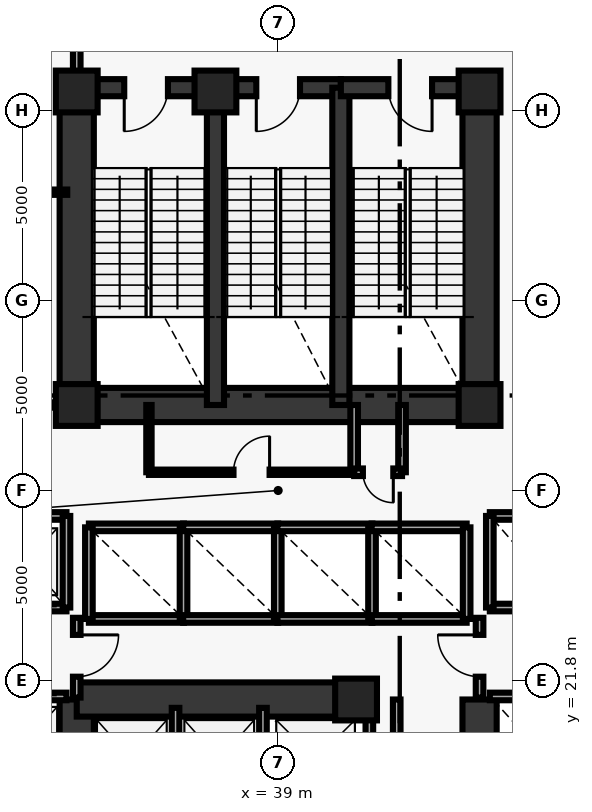
"""IFC4 building model, lengths in metres.
Left out: names, types, materials, properties, quantities, classifications, styles, units other than length and angle.
Written with IfcOpenShell. Run it as: python <this file> out.ifc"""

import sys

from ifc_helpers import new_model, si_unit, direction, frame, frame_2d, origin, origin_2d, place, context, subcontext, project, spatial, rectangle, extrude, element, fill, save


model = new_model("IFC4")
c1 = context("Model", 3, precision=1e-05, world=origin(), true_north=direction((0.0, 1.0)))
c2 = subcontext(c1, "Body", "Model", "MODEL_VIEW")
j1 = project(units=[si_unit("LENGTHUNIT", "METRE"), si_unit("PLANEANGLEUNIT", "RADIAN")], contexts=[c1])
p1 = place(None, origin())
s1 = spatial("IfcSite", under=j1, at=p1, CompositionType="ELEMENT")
p2 = place(p1, origin())
s2 = spatial("IfcBuilding", under=s1, at=p2, CompositionType="ELEMENT")
p3 = place(p2, frame((0.0, 0.0, 16.0)))
s3 = spatial("IfcBuildingStorey", under=s2, at=p3, CompositionType="ELEMENT", Elevation=16.0)
for number, where, z_axis, x_axis in (
    (1, (41.05, 21.3, 0.0), (0.0, 0.0, 1.0), (1.0, 0.0, 0.0)),
    (2, (44.3, 29.05, 0.0), (0.0, 0.0, 1.0), (1.0, 0.0, 0.0)),
    (3, (44.3, 37.3, 0.0), (0.0, 0.0, 1.0), (1.0, 0.0, 0.0)),
    (4, (37.35, 37.3, 0.0), (0.0, 0.0, 1.0), (1.0, 0.0, 0.0)),
    (5, (33.7, 37.3, 0.0), (0.0, 0.0, 1.0), (1.0, 0.0, 0.0)),
    (6, (33.7, 29.05, 0.0), (0.0, 0.0, 1.0), (1.0, 0.0, 0.0)),
):
    element("IfcColumn", number, at=place(p3, frame(where, z_axis=z_axis, x_axis=x_axis)), inside=s3, PredefinedType="PILASTER", context=c2, shape_type="SweptSolid", body=[
        extrude(rectangle(XDim=1.1, YDim=1.1, at=origin_2d()), origin(), (0.0, 0.0, 1.0), 4.74),
    ])
p4 = place(p3, frame((33.7, 29.05, 0.0), z_axis=(0.0, 0.0, 1.0), x_axis=(0.0, 1.0, 0.0)))
e7 = element("IfcWall", 7, at=p4, inside=s3, PredefinedType="SHEAR", context=c2, shape_type="SweptSolid", body=[
    extrude(rectangle(XDim=8.35, YDim=0.9, at=frame_2d((4.175, 0.0))), origin(), (0.0, 0.0, 1.0), 4.74),
])
p5 = place(p3, frame((33.7, 18.35, 0.0), z_axis=(0.0, 0.0, 1.0), x_axis=(0.0, 1.0, 0.0)))
e8 = element("IfcWall", 8, at=p5, inside=s3, PredefinedType="SHEAR", context=c2, shape_type="SweptSolid", body=[
    extrude(rectangle(XDim=2.95, YDim=0.9, at=frame_2d((1.475, 0.0))), origin(), (0.0, 0.0, 1.0), 4.74),
])
p6 = place(p3, frame((44.3, 29.05, 0.0), z_axis=(0.0, 0.0, 1.0), x_axis=(0.0, 1.0, 0.0)))
e9 = element("IfcWall", 9, at=p6, inside=s3, PredefinedType="SHEAR", context=c2, shape_type="SweptSolid", body=[
    extrude(rectangle(XDim=8.35, YDim=0.9, at=frame_2d((4.175, 0.0))), origin(), (0.0, 0.0, 1.0), 4.74),
])
p7 = place(p3, frame((44.3, 18.35, 0.0), z_axis=(0.0, 0.0, 1.0), x_axis=(0.0, 1.0, 0.0)))
e10 = element("IfcWall", 10, at=p7, inside=s3, PredefinedType="SHEAR", context=c2, shape_type="SweptSolid", body=[
    extrude(rectangle(XDim=2.95, YDim=0.9, at=frame_2d((1.475, 0.0))), origin(), (0.0, 0.0, 1.0), 4.74),
])
p8 = place(p3, frame((33.7, 29.05, 0.0), z_axis=(0.0, 0.0, 1.0), x_axis=(1.0, 0.0, 0.0)))
e11 = element("IfcWall", 11, at=p8, inside=s3, PredefinedType="SHEAR", context=c2, shape_type="SweptSolid", body=[
    extrude(rectangle(XDim=10.6, YDim=0.9, at=frame_2d((5.3, 0.0))), origin(), (0.0, 0.0, 1.0), 4.74),
])
p9 = place(p3, frame((33.7, 21.3, 0.0), z_axis=(0.0, 0.0, 1.0), x_axis=(1.0, 0.0, 0.0)))
e12 = element("IfcWall", 12, at=p9, inside=s3, PredefinedType="SHEAR", context=c2, shape_type="SweptSolid", body=[
    extrude(rectangle(XDim=7.55, YDim=0.9, at=frame_2d((3.775, 0.0))), origin(), (0.0, 0.0, 1.0), 4.74),
])
p10 = place(p3, frame((37.35, 37.4, 0.0), z_axis=(0.0, 0.0, 1.0), x_axis=(-1.0, 0.0, 0.0)))
e13 = element("IfcWall", 13, at=p10, inside=s3, PredefinedType="SHEAR", context=c2, shape_type="SweptSolid", body=[
    extrude(rectangle(XDim=3.65, YDim=0.45, at=frame_2d((1.825, 0.0))), origin(), (0.0, 0.0, 1.0), 4.74),
])
p11 = place(p10, frame((1.25, 0.0, 0.0)))
e14 = element("IfcOpeningElement", 14, at=p11, cuts=e13, PredefinedType="OPENING", context=c2, shape_type="SweptSolid", body=[
    extrude(rectangle(XDim=1.15, YDim=2.15, at=frame_2d((0.575, 1.075))), frame((0.0, 0.235, 0.0), z_axis=(0.0, -1.0, 0.0), x_axis=(1.0, 0.0, 0.0)), (0.0, 0.0, 1.0), 0.47),
])
p12 = place(p3, frame((37.35, 29.05, 0.0), z_axis=(0.0, 0.0, 1.0), x_axis=(0.0, 1.0, 0.0)))
e15 = element("IfcWall", 15, at=p12, inside=s3, PredefinedType="SHEAR", context=c2, shape_type="SweptSolid", body=[
    extrude(rectangle(XDim=8.35, YDim=0.45, at=frame_2d((4.175, 0.0))), origin(), (0.0, 0.0, 1.0), 4.74),
])
p13 = place(p3, frame((40.65, 37.4, 0.0), z_axis=(0.0, 0.0, 1.0), x_axis=(-1.0, 0.0, 0.0)))
e16 = element("IfcWall", 16, at=p13, inside=s3, PredefinedType="SHEAR", context=c2, shape_type="SweptSolid", body=[
    extrude(rectangle(XDim=3.3, YDim=0.45, at=frame_2d((1.65, 0.0))), origin(), (0.0, 0.0, 1.0), 4.74),
])
p14 = place(p13, frame((1.075, 0.0, 0.0)))
e17 = element("IfcOpeningElement", 17, at=p14, cuts=e16, PredefinedType="OPENING", context=c2, shape_type="SweptSolid", body=[
    extrude(rectangle(XDim=1.15, YDim=2.15, at=frame_2d((0.575, 1.075))), frame((0.0, 0.235, 0.0), z_axis=(0.0, -1.0, 0.0), x_axis=(1.0, 0.0, 0.0)), (0.0, 0.0, 1.0), 0.47),
])
p15 = place(p3, frame((40.65, 29.05, 0.0), z_axis=(0.0, 0.0, 1.0), x_axis=(0.0, 1.0, 0.0)))
e18 = element("IfcWall", 18, at=p15, inside=s3, PredefinedType="SHEAR", context=c2, shape_type="SweptSolid", body=[
    extrude(rectangle(XDim=8.35, YDim=0.45, at=frame_2d((4.175, 0.0))), origin(), (0.0, 0.0, 1.0), 4.74),
])
p16 = place(p3, frame((44.3, 37.4, 0.0), z_axis=(0.0, 0.0, 1.0), x_axis=(-1.0, 0.0, 0.0)))
e19 = element("IfcWall", 19, at=p16, inside=s3, PredefinedType="SHEAR", context=c2, shape_type="SweptSolid", body=[
    extrude(rectangle(XDim=3.65, YDim=0.45, at=frame_2d((1.825, 0.0))), origin(), (0.0, 0.0, 1.0), 4.74),
])
p17 = place(p16, frame((1.25, 0.0, 0.0)))
e20 = element("IfcOpeningElement", 20, at=p17, cuts=e19, PredefinedType="OPENING", context=c2, shape_type="SweptSolid", body=[
    extrude(rectangle(XDim=1.15, YDim=2.15, at=frame_2d((0.575, 1.075))), frame((0.0, 0.235, 0.0), z_axis=(0.0, -1.0, 0.0), x_axis=(1.0, 0.0, 0.0)), (0.0, 0.0, 1.0), 0.47),
])
p18 = place(p3, frame((33.7, 37.4, 0.0), z_axis=(0.0, 0.0, 1.0), x_axis=(0.0, 1.0, 0.0)))
e21 = element("IfcWall", 21, at=p18, inside=s3, PredefinedType="SOLIDWALL", context=c2, shape_type="SweptSolid", body=[
    extrude(rectangle(XDim=1.88, YDim=0.2, at=frame_2d((0.94, 0.0))), origin(), (0.0, 0.0, 1.0), 4.74),
])
p19 = place(p3, frame((35.6, 27.28, 0.0), z_axis=(0.0, 0.0, 1.0), x_axis=(0.0, 1.0, 0.0)))
e22 = element("IfcWall", 22, at=p19, inside=s3, PredefinedType="PARTITIONING", context=c2, shape_type="SweptSolid", body=[
    extrude(rectangle(XDim=1.77, YDim=0.14, at=frame_2d((0.885, 0.0))), origin(), (0.0, 0.0, 1.0), 4.74),
])
for number, where, z_axis, x_axis in (
    (23, (41.0, 27.28, 0.0), (0.0, 0.0, 1.0), (0.0, 1.0, 0.0)),
    (24, (42.26, 27.28, 0.0), (0.0, 0.0, 1.0), (0.0, 1.0, 0.0)),
):
    element("IfcWall", number, at=place(p3, frame(where, z_axis=z_axis, x_axis=x_axis)), inside=s3, PredefinedType="SOLIDWALL", context=c2, shape_type="SweptSolid", body=[
        extrude(rectangle(XDim=1.77, YDim=0.2, at=frame_2d((0.885, 0.0))), origin(), (0.0, 0.0, 1.0), 4.74),
    ])
p20 = place(p3, frame((41.0, 27.28, 0.0), z_axis=(0.0, 0.0, 1.0), x_axis=(1.0, 0.0, 0.0)))
e25 = element("IfcWall", 25, at=p20, inside=s3, PredefinedType="SOLIDWALL", context=c2, shape_type="SweptSolid", body=[
    extrude(rectangle(XDim=1.26, YDim=0.2, at=frame_2d((0.63, 0.0))), origin(), (0.0, 0.0, 1.0), 4.74),
])
p21 = place(p20, frame((0.23, 0.0, 0.0)))
e26 = element("IfcOpeningElement", 26, at=p21, cuts=e25, PredefinedType="OPENING", context=c2, shape_type="SweptSolid", body=[
    extrude(rectangle(XDim=0.8, YDim=2.05, at=frame_2d((0.4, 1.025))), frame((0.0, 0.11, 0.0), z_axis=(0.0, -1.0, 0.0), x_axis=(1.0, 0.0, 0.0)), (0.0, 0.0, 1.0), 0.22),
])
p22 = place(p3, frame((31.32, 23.72, 0.0), z_axis=(0.0, 0.0, 1.0), x_axis=(1.0, 0.0, 0.0)))
e27 = element("IfcWall", 27, at=p22, inside=s3, PredefinedType="SOLIDWALL", context=c2, shape_type="SweptSolid", body=[
    extrude(rectangle(XDim=2.11, YDim=0.2, at=frame_2d((1.055, 0.0))), origin(), (0.0, 0.0, 1.0), 4.74),
])
p23 = place(p22, frame((0.505, 0.0, 0.0)))
e28 = element("IfcOpeningElement", 28, at=p23, cuts=e27, PredefinedType="OPENING", context=c2, shape_type="SweptSolid", body=[
    extrude(rectangle(XDim=1.1, YDim=2.15, at=frame_2d((0.55, 1.075))), frame((0.0, 0.11, 0.0), z_axis=(0.0, -1.0, 0.0), x_axis=(1.0, 0.0, 0.0)), (0.0, 0.0, 1.0), 0.22),
])
p24 = place(p3, frame((31.32, 26.13, 0.0), z_axis=(0.0, 0.0, 1.0), x_axis=(1.0, 0.0, 0.0)))
e29 = element("IfcWall", 29, at=p24, inside=s3, PredefinedType="SOLIDWALL", context=c2, shape_type="SweptSolid", body=[
    extrude(rectangle(XDim=2.11, YDim=0.2, at=frame_2d((1.055, 0.0))), origin(), (0.0, 0.0, 1.0), 4.74),
])
p25 = place(p3, frame((33.43, 23.72, 0.0), z_axis=(0.0, 0.0, 1.0), x_axis=(0.0, 1.0, 0.0)))
e30 = element("IfcWall", 30, at=p25, inside=s3, PredefinedType="SOLIDWALL", context=c2, shape_type="SweptSolid", body=[
    extrude(rectangle(XDim=2.41, YDim=0.2, at=frame_2d((1.205, 0.0))), origin(), (0.0, 0.0, 1.0), 4.74),
])
p26 = place(p3, frame((31.32, 21.38, 0.0), z_axis=(0.0, 0.0, 1.0), x_axis=(1.0, 0.0, 0.0)))
e31 = element("IfcWall", 31, at=p26, inside=s3, PredefinedType="SOLIDWALL", context=c2, shape_type="SweptSolid", body=[
    extrude(rectangle(XDim=2.11, YDim=0.2, at=frame_2d((1.055, 0.0))), origin(), (0.0, 0.0, 1.0), 4.74),
])
p27 = place(p26, frame((0.505, 0.0, 0.0)))
e32 = element("IfcOpeningElement", 32, at=p27, cuts=e31, PredefinedType="OPENING", context=c2, shape_type="SweptSolid", body=[
    extrude(rectangle(XDim=1.1, YDim=2.15, at=frame_2d((0.55, 1.075))), frame((0.0, 0.11, 0.0), z_axis=(0.0, -1.0, 0.0), x_axis=(1.0, 0.0, 0.0)), (0.0, 0.0, 1.0), 0.22),
])
for number, where, z_axis, x_axis in (
    (33, (44.57, 23.72, 0.0), (0.0, 0.0, 1.0), (1.0, 0.0, 0.0)),
    (34, (44.57, 26.13, 0.0), (0.0, 0.0, 1.0), (1.0, 0.0, 0.0)),
):
    element("IfcWall", number, at=place(p3, frame(where, z_axis=z_axis, x_axis=x_axis)), inside=s3, PredefinedType="SOLIDWALL", context=c2, shape_type="SweptSolid", body=[
        extrude(rectangle(XDim=2.11, YDim=0.2, at=frame_2d((1.055, 0.0))), origin(), (0.0, 0.0, 1.0), 4.74),
    ])
p28 = place(p3, frame((44.57, 23.72, 0.0), z_axis=(0.0, 0.0, 1.0), x_axis=(0.0, 1.0, 0.0)))
e35 = element("IfcWall", 35, at=p28, inside=s3, PredefinedType="SOLIDWALL", context=c2, shape_type="SweptSolid", body=[
    extrude(rectangle(XDim=2.41, YDim=0.2, at=frame_2d((1.205, 0.0))), origin(), (0.0, 0.0, 1.0), 4.74),
])
p29 = place(p3, frame((44.57, 21.38, 0.0), z_axis=(0.0, 0.0, 1.0), x_axis=(1.0, 0.0, 0.0)))
e36 = element("IfcWall", 36, at=p29, inside=s3, PredefinedType="SOLIDWALL", context=c2, shape_type="SweptSolid", body=[
    extrude(rectangle(XDim=2.11, YDim=0.2, at=frame_2d((1.055, 0.0))), origin(), (0.0, 0.0, 1.0), 4.74),
])
for number, where, z_axis, x_axis in (
    (37, (34.02, 23.42, 0.0), (0.0, 0.0, 1.0), (1.0, 0.0, 0.0)),
    (38, (34.02, 25.83, 0.0), (0.0, 0.0, 1.0), (1.0, 0.0, 0.0)),
):
    element("IfcWall", number, at=place(p3, frame(where, z_axis=z_axis, x_axis=x_axis)), inside=s3, PredefinedType="SOLIDWALL", context=c2, shape_type="SweptSolid", body=[
        extrude(rectangle(XDim=2.5, YDim=0.2, at=frame_2d((1.25, 0.0))), origin(), (0.0, 0.0, 1.0), 4.74),
    ])
for number, where, z_axis, x_axis in (
    (39, (34.02, 23.42, 0.0), (0.0, 0.0, 1.0), (0.0, 1.0, 0.0)),
    (40, (36.51, 23.42, 0.0), (0.0, 0.0, 1.0), (0.0, 1.0, 0.0)),
):
    element("IfcWall", number, at=place(p3, frame(where, z_axis=z_axis, x_axis=x_axis)), inside=s3, PredefinedType="SOLIDWALL", context=c2, shape_type="SweptSolid", body=[
        extrude(rectangle(XDim=2.41, YDim=0.2, at=frame_2d((1.205, 0.0))), origin(), (0.0, 0.0, 1.0), 4.74),
    ])
for number, where, z_axis, x_axis in (
    (41, (36.5, 23.42, 0.0), (0.0, 0.0, 1.0), (1.0, 0.0, 0.0)),
    (42, (36.5, 25.83, 0.0), (0.0, 0.0, 1.0), (1.0, 0.0, 0.0)),
):
    element("IfcWall", number, at=place(p3, frame(where, z_axis=z_axis, x_axis=x_axis)), inside=s3, PredefinedType="SOLIDWALL", context=c2, shape_type="SweptSolid", body=[
        extrude(rectangle(XDim=2.5, YDim=0.2, at=frame_2d((1.25, 0.0))), origin(), (0.0, 0.0, 1.0), 4.74),
    ])
p30 = place(p3, frame((38.99, 23.42, 0.0), z_axis=(0.0, 0.0, 1.0), x_axis=(0.0, 1.0, 0.0)))
e43 = element("IfcWall", 43, at=p30, inside=s3, PredefinedType="SOLIDWALL", context=c2, shape_type="SweptSolid", body=[
    extrude(rectangle(XDim=2.41, YDim=0.2, at=frame_2d((1.205, 0.0))), origin(), (0.0, 0.0, 1.0), 4.74),
])
for number, where, z_axis, x_axis in (
    (44, (38.98, 23.42, 0.0), (0.0, 0.0, 1.0), (1.0, 0.0, 0.0)),
    (45, (38.98, 25.83, 0.0), (0.0, 0.0, 1.0), (1.0, 0.0, 0.0)),
):
    element("IfcWall", number, at=place(p3, frame(where, z_axis=z_axis, x_axis=x_axis)), inside=s3, PredefinedType="SOLIDWALL", context=c2, shape_type="SweptSolid", body=[
        extrude(rectangle(XDim=2.5, YDim=0.2, at=frame_2d((1.25, 0.0))), origin(), (0.0, 0.0, 1.0), 4.74),
    ])
p31 = place(p3, frame((41.47, 23.42, 0.0), z_axis=(0.0, 0.0, 1.0), x_axis=(0.0, 1.0, 0.0)))
e46 = element("IfcWall", 46, at=p31, inside=s3, PredefinedType="SOLIDWALL", context=c2, shape_type="SweptSolid", body=[
    extrude(rectangle(XDim=2.41, YDim=0.2, at=frame_2d((1.205, 0.0))), origin(), (0.0, 0.0, 1.0), 4.74),
])
for number, where, z_axis, x_axis in (
    (47, (41.46, 23.42, 0.0), (0.0, 0.0, 1.0), (1.0, 0.0, 0.0)),
    (48, (41.46, 25.83, 0.0), (0.0, 0.0, 1.0), (1.0, 0.0, 0.0)),
):
    element("IfcWall", number, at=place(p3, frame(where, z_axis=z_axis, x_axis=x_axis)), inside=s3, PredefinedType="SOLIDWALL", context=c2, shape_type="SweptSolid", body=[
        extrude(rectangle(XDim=2.5, YDim=0.2, at=frame_2d((1.25, 0.0))), origin(), (0.0, 0.0, 1.0), 4.74),
    ])
p32 = place(p3, frame((43.96, 23.42, 0.0), z_axis=(0.0, 0.0, 1.0), x_axis=(0.0, 1.0, 0.0)))
e49 = element("IfcWall", 49, at=p32, inside=s3, PredefinedType="SOLIDWALL", context=c2, shape_type="SweptSolid", body=[
    extrude(rectangle(XDim=2.41, YDim=0.2, at=frame_2d((1.205, 0.0))), origin(), (0.0, 0.0, 1.0), 4.74),
])
for number, where, z_axis, x_axis in (
    (50, (36.3, 18.37, 0.0), (0.0, 0.0, 1.0), (0.0, 1.0, 0.0)),
    (51, (38.6, 18.37, 0.0), (0.0, 0.0, 1.0), (0.0, 1.0, 0.0)),
    (52, (41.4, 18.37, 0.0), (0.0, 0.0, 1.0), (0.0, 1.0, 0.0)),
):
    element("IfcWall", number, at=place(p3, frame(where, z_axis=z_axis, x_axis=x_axis)), inside=s3, PredefinedType="SOLIDWALL", context=c2, shape_type="SweptSolid", body=[
        extrude(rectangle(XDim=2.71, YDim=0.2, at=frame_2d((1.355, 0.0))), origin(), (0.0, 0.0, 1.0), 4.74),
    ])
p33 = place(p3, frame((33.7, 21.35, 0.0), z_axis=(0.0, 0.0, 1.0), x_axis=(0.0, 1.0, 0.0)))
e53 = element("IfcWall", 53, at=p33, inside=s3, PredefinedType="SOLIDWALL", context=c2, shape_type="SweptSolid", body=[
    extrude(rectangle(XDim=2.1, YDim=0.2, at=frame_2d((1.05, 0.0))), origin(), (0.0, 0.0, 1.0), 3.96),
])
p34 = place(p33, frame((0.55, 0.0, 0.0)))
e54 = element("IfcOpeningElement", 54, at=p34, cuts=e53, PredefinedType="OPENING", context=c2, shape_type="SweptSolid", body=[
    extrude(rectangle(XDim=1.1, YDim=2.15, at=frame_2d((0.55, 1.075))), frame((0.0, 0.11, 0.0), z_axis=(0.0, -1.0, 0.0), x_axis=(1.0, 0.0, 0.0)), (0.0, 0.0, 1.0), 0.22),
])
p35 = place(p3, frame((44.3, 21.35, 0.0), z_axis=(0.0, 0.0, 1.0), x_axis=(0.0, 1.0, 0.0)))
e55 = element("IfcWall", 55, at=p35, inside=s3, PredefinedType="SOLIDWALL", context=c2, shape_type="SweptSolid", body=[
    extrude(rectangle(XDim=2.1, YDim=0.2, at=frame_2d((1.05, 0.0))), origin(), (0.0, 0.0, 1.0), 3.96),
])
p36 = place(p35, frame((0.55, 0.0, 0.0)))
e56 = element("IfcOpeningElement", 56, at=p36, cuts=e55, PredefinedType="OPENING", context=c2, shape_type="SweptSolid", body=[
    extrude(rectangle(XDim=1.1, YDim=2.15, at=frame_2d((0.55, 1.075))), frame((0.0, 0.11, 0.0), z_axis=(0.0, -1.0, 0.0), x_axis=(1.0, 0.0, 0.0)), (0.0, 0.0, 1.0), 0.22),
])
p37 = place(p3, frame((42.12, 18.35, 0.0), z_axis=(0.0, 0.0, 1.0), x_axis=(0.0, 1.0, 0.0)))
e57 = element("IfcWall", 57, at=p37, inside=s3, PredefinedType="SOLIDWALL", context=c2, shape_type="SweptSolid", body=[
    extrude(rectangle(XDim=2.95, YDim=0.2, at=frame_2d((1.475, 0.0))), origin(), (0.0, 0.0, 1.0), 4.74),
])
p38 = place(p37, frame((0.2, 0.0, 0.0)))
e58 = element("IfcOpeningElement", 58, at=p38, cuts=e57, PredefinedType="OPENING", context=c2, shape_type="SweptSolid", body=[
    extrude(rectangle(XDim=0.8, YDim=2.05, at=frame_2d((0.4, 1.025))), frame((0.0, 0.11, 0.0), z_axis=(0.0, -1.0, 0.0), x_axis=(1.0, 0.0, 0.0)), (0.0, 0.0, 1.0), 0.22),
])
p39 = place(p3, frame((35.6, 27.28, 0.0), z_axis=(0.0, 0.0, 1.0), x_axis=(1.0, 0.0, 0.0)))
e59 = element("IfcWall", 59, at=p39, inside=s3, PredefinedType="PARTITIONING", context=c2, shape_type="SweptSolid", body=[
    extrude(rectangle(XDim=5.4, YDim=0.14, at=frame_2d((2.7, 0.0))), origin(), (0.0, 0.0, 1.0), 4.74),
])
p40 = place(p39, frame((2.225, 0.0, 0.0)))
e60 = element("IfcOpeningElement", 60, at=p40, cuts=e59, PredefinedType="OPENING", context=c2, shape_type="SweptSolid", body=[
    extrude(rectangle(XDim=0.95, YDim=2.1, at=frame_2d((0.475, 1.05))), frame((0.0, 0.08, 0.0), z_axis=(0.0, -1.0, 0.0), x_axis=(1.0, 0.0, 0.0)), (0.0, 0.0, 1.0), 0.16),
])
p41 = place(p3, frame((30.85, 29.05, 0.0), z_axis=(0.0, 0.0, 1.0), x_axis=(1.0, 0.0, 0.0)))
e61 = element("IfcWall", 61, at=p41, inside=s3, PredefinedType="PARTITIONING", context=c2, shape_type="SweptSolid", body=[
    extrude(rectangle(XDim=2.6, YDim=0.14, at=frame_2d((1.3, 0.0))), origin(), (0.0, 0.0, 1.0), 2.74),
])
p42 = place(p41, frame((0.9, 0.0, 0.0)))
e62 = element("IfcOpeningElement", 62, at=p42, cuts=e61, PredefinedType="OPENING", context=c2, shape_type="SweptSolid", body=[
    extrude(rectangle(XDim=0.8, YDim=2.05, at=frame_2d((0.4, 1.025))), frame((0.0, 0.08, 0.0), z_axis=(0.0, -1.0, 0.0), x_axis=(1.0, 0.0, 0.0)), (0.0, 0.0, 1.0), 0.16),
])
p43 = place(p3, frame((30.85, 34.65, 0.0), z_axis=(0.0, 0.0, 1.0), x_axis=(1.0, 0.0, 0.0)))
e63 = element("IfcWall", 63, at=p43, inside=s3, PredefinedType="PARTITIONING", context=c2, shape_type="SweptSolid", body=[
    extrude(rectangle(XDim=2.6, YDim=0.14, at=frame_2d((1.3, 0.0))), origin(), (0.0, 0.0, 1.0), 4.74),
])
p44 = place(p11, origin())
e64 = element("IfcDoor", 64, at=p44, inside=s3, OperationType="SINGLE_SWING_RIGHT", PredefinedType="DOOR", context=c2, shape_type="SweptSolid", body=[
    extrude(rectangle(XDim=1.15, YDim=2.15, at=frame_2d((0.575, 1.075))), frame((0.0, 0.025, 0.0), z_axis=(0.0, -1.0, 0.0), x_axis=(1.0, 0.0, 0.0)), (0.0, 0.0, 1.0), 0.05),
])
fill(e14, e64)
p45 = place(p14, origin())
e65 = element("IfcDoor", 65, at=p45, inside=s3, OperationType="SINGLE_SWING_RIGHT", PredefinedType="DOOR", context=c2, shape_type="SweptSolid", body=[
    extrude(rectangle(XDim=1.15, YDim=2.15, at=frame_2d((0.575, 1.075))), frame((0.0, 0.025, 0.0), z_axis=(0.0, -1.0, 0.0), x_axis=(1.0, 0.0, 0.0)), (0.0, 0.0, 1.0), 0.05),
])
fill(e17, e65)
p46 = place(p17, origin())
e66 = element("IfcDoor", 66, at=p46, inside=s3, OperationType="SINGLE_SWING_LEFT", PredefinedType="DOOR", context=c2, shape_type="SweptSolid", body=[
    extrude(rectangle(XDim=1.15, YDim=2.15, at=frame_2d((0.575, 1.075))), frame((0.0, 0.025, 0.0), z_axis=(0.0, -1.0, 0.0), x_axis=(1.0, 0.0, 0.0)), (0.0, 0.0, 1.0), 0.05),
])
fill(e20, e66)
p47 = place(p21, origin())
e67 = element("IfcDoor", 67, at=p47, inside=s3, OperationType="SINGLE_SWING_RIGHT", PredefinedType="DOOR", context=c2, shape_type="SweptSolid", body=[
    extrude(rectangle(XDim=0.8, YDim=2.05, at=frame_2d((0.4, 1.025))), frame((0.0, 0.025, 0.0), z_axis=(0.0, -1.0, 0.0), x_axis=(1.0, 0.0, 0.0)), (0.0, 0.0, 1.0), 0.05),
])
fill(e26, e67)
p48 = place(p34, origin())
e68 = element("IfcDoor", 68, at=p48, inside=s3, OperationType="SINGLE_SWING_RIGHT", PredefinedType="DOOR", context=c2, shape_type="SweptSolid", body=[
    extrude(rectangle(XDim=1.1, YDim=2.15, at=frame_2d((0.55, 1.075))), frame((0.0, 0.025, 0.0), z_axis=(0.0, -1.0, 0.0), x_axis=(1.0, 0.0, 0.0)), (0.0, 0.0, 1.0), 0.05),
])
fill(e54, e68)
p49 = place(p36, origin())
e69 = element("IfcDoor", 69, at=p49, inside=s3, OperationType="SINGLE_SWING_RIGHT", PredefinedType="DOOR", context=c2, shape_type="SweptSolid", body=[
    extrude(rectangle(XDim=1.1, YDim=2.15, at=frame_2d((0.55, 1.075))), frame((0.0, 0.025, 0.0), z_axis=(0.0, -1.0, 0.0), x_axis=(1.0, 0.0, 0.0)), (0.0, 0.0, 1.0), 0.05),
])
fill(e56, e69)
p50 = place(p40, origin())
e70 = element("IfcDoor", 70, at=p50, inside=s3, OperationType="SINGLE_SWING_RIGHT", PredefinedType="DOOR", context=c2, shape_type="SweptSolid", body=[
    extrude(rectangle(XDim=0.95, YDim=2.1, at=frame_2d((0.475, 1.05))), frame((0.0, 0.025, 0.0), z_axis=(0.0, -1.0, 0.0), x_axis=(1.0, 0.0, 0.0)), (0.0, 0.0, 1.0), 0.05),
])
fill(e60, e70)
save(model, sys.argv[1])
